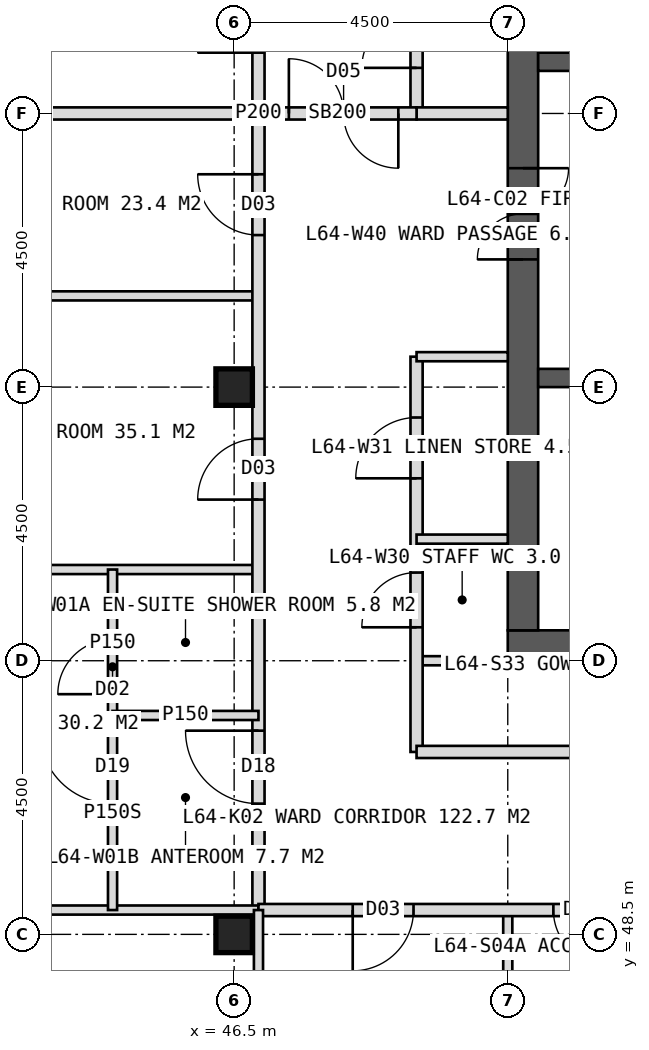
"""IFC4 building model, lengths in metres.
Left out: names, types, materials, properties, quantities, classifications, styles, units other than length and angle.
Written with IfcOpenShell. Run it as: python <this file> out.ifc"""

import sys

from ifc_helpers import new_model, si_unit, direction, frame, frame_2d, origin, origin_2d, place, context, subcontext, project, spatial, rectangle, hollow_rectangle, extrude, element, fill, save


model = new_model("IFC4")
c1 = context("Model", 3, precision=1e-05, world=origin(), true_north=direction((0.0, 1.0)))
c2 = subcontext(c1, "Body", "Model", "MODEL_VIEW")
j1 = project(units=[si_unit("LENGTHUNIT", "METRE"), si_unit("PLANEANGLEUNIT", "RADIAN")], contexts=[c1])
p1 = place(None, origin())
s1 = spatial("IfcSite", under=j1, at=p1, CompositionType="ELEMENT")
p2 = place(p1, origin())
s2 = spatial("IfcBuilding", under=s1, at=p2, CompositionType="ELEMENT")
p3 = place(p2, frame((0.0, 0.0, 266.0)))
s3 = spatial("IfcBuildingStorey", under=s2, at=p3, CompositionType="ELEMENT", Elevation=266.0)
p4 = place(p3, frame((51.0, 53.25, 0.0), z_axis=(0.0, 0.0, 1.0), x_axis=(1.0, 0.0, 0.0)))
e1 = element("IfcWall", 1, at=p4, inside=s3, PredefinedType="SHEAR", context=c2, shape_type="SweptSolid", body=[
    extrude(rectangle(XDim=18.0, YDim=0.5, at=frame_2d((9.0, 0.0))), origin(), (0.0, 0.0, 1.0), 4.0),
])
p5 = place(p4, frame((8.1, 0.0, 0.0)))
e2 = element("IfcOpeningElement", 2, at=p5, cuts=e1, PredefinedType="OPENING", context=c2, shape_type="SweptSolid", body=[
    extrude(rectangle(XDim=1.8, YDim=2.2, at=frame_2d((0.9, 1.1))), frame((0.0, 0.26, 0.0), z_axis=(0.0, -1.0, 0.0), x_axis=(1.0, 0.0, 0.0)), (0.0, 0.0, 1.0), 0.52),
])
p6 = place(p3, frame((51.25, 53.5, 0.0), z_axis=(0.0, 0.0, 1.0), x_axis=(0.0, 1.0, 0.0)))
e3 = element("IfcWall", 3, at=p6, inside=s3, PredefinedType="SHEAR", context=c2, shape_type="SweptSolid", body=[
    extrude(rectangle(XDim=17.0, YDim=0.5, at=frame_2d((8.5, 0.0))), origin(), (0.0, 0.0, 1.0), 4.0),
])
p7 = place(p6, frame((6.1, 0.0, 0.0)))
e4 = element("IfcOpeningElement", 4, at=p7, cuts=e3, PredefinedType="OPENING", context=c2, shape_type="SweptSolid", body=[
    extrude(rectangle(XDim=1.5, YDim=2.2, at=frame_2d((0.75, 1.1))), frame((0.0, 0.26, 0.0), z_axis=(0.0, -1.0, 0.0), x_axis=(1.0, 0.0, 0.0)), (0.0, 0.0, 1.0), 0.52),
])
p8 = place(p3, frame((51.5, 62.85, 0.0), z_axis=(0.0, 0.0, 1.0), x_axis=(1.0, 0.0, 0.0)))
e5 = element("IfcWall", 5, at=p8, inside=s3, PredefinedType="SHEAR", context=c2, shape_type="SweptSolid", body=[
    extrude(rectangle(XDim=3.3, YDim=0.3, at=frame_2d((1.65, 0.0))), origin(), (0.0, 0.0, 1.0), 4.0),
])
p9 = place(p8, frame((1.15, 0.0, 0.0)))
e6 = element("IfcOpeningElement", 6, at=p9, cuts=e5, PredefinedType="OPENING", context=c2, shape_type="SweptSolid", body=[
    extrude(rectangle(XDim=1.2, YDim=2.1, at=frame_2d((0.6, 1.05))), frame((0.0, 0.16, 0.0), z_axis=(0.0, -1.0, 0.0), x_axis=(1.0, 0.0, 0.0)), (0.0, 0.0, 1.0), 0.32),
])
p10 = place(p3, frame((51.5, 57.65, 0.0), z_axis=(0.0, 0.0, 1.0), x_axis=(1.0, 0.0, 0.0)))
e7 = element("IfcWall", 7, at=p10, inside=s3, PredefinedType="SHEAR", context=c2, shape_type="SweptSolid", body=[
    extrude(rectangle(XDim=3.3, YDim=0.3, at=frame_2d((1.65, 0.0))), origin(), (0.0, 0.0, 1.0), 4.0),
])
p11 = place(p10, frame((1.15, 0.0, 0.0)))
e8 = element("IfcOpeningElement", 8, at=p11, cuts=e7, PredefinedType="OPENING", context=c2, shape_type="SweptSolid", body=[
    extrude(rectangle(XDim=1.2, YDim=2.2, at=frame_2d((0.6, 1.1))), frame((0.0, 0.16, 0.0), z_axis=(0.0, -1.0, 0.0), x_axis=(1.0, 0.0, 0.0)), (0.0, 0.0, 1.0), 0.32),
])
for number, where, z_axis, x_axis in (
    (9, (46.5, 48.5, 0.0), (0.0, 0.0, 1.0), (1.0, 0.0, 0.0)),
    (10, (46.5, 57.5, 0.0), (0.0, 0.0, 1.0), (1.0, 0.0, 0.0)),
):
    element("IfcColumn", number, at=place(p3, frame(where, z_axis=z_axis, x_axis=x_axis)), inside=s3, PredefinedType="COLUMN", context=c2, shape_type="SweptSolid", body=[
        extrude(hollow_rectangle(XDim=0.6, YDim=0.6, WallThickness=0.04, at=origin_2d()), origin(), (0.0, 0.0, 1.0), 4.0),
    ])
for number, where, z_axis, x_axis in (
    (11, (46.9, 54.5, 0.0), (0.0, 0.0, 1.0), (-1.0, 0.0, 0.0)),
    (12, (46.9, 59.0, 0.0), (0.0, 0.0, 1.0), (-1.0, 0.0, 0.0)),
):
    element("IfcWall", number, at=place(p3, frame(where, z_axis=z_axis, x_axis=x_axis)), inside=s3, PredefinedType="PARTITIONING", context=c2, shape_type="SweptSolid", body=[
        extrude(rectangle(XDim=7.8, YDim=0.15, at=frame_2d((3.9, 0.0))), origin(), (0.0, 0.0, 1.0), 3.75),
    ])
p12 = place(p3, frame((46.9, 62.0, 0.0), z_axis=(0.0, 0.0, 1.0), x_axis=(-1.0, 0.0, 0.0)))
e13 = element("IfcWall", 13, at=p12, inside=s3, PredefinedType="SOLIDWALL", context=c2, shape_type="SweptSolid", body=[
    extrude(rectangle(XDim=7.8, YDim=0.2, at=frame_2d((3.9, 0.0))), origin(), (0.0, 0.0, 1.0), 2.75),
])
p13 = place(p3, frame((46.9, 48.9, 0.0), z_axis=(0.0, 0.0, 1.0), x_axis=(0.0, 1.0, 0.0)))
e14 = element("IfcWall", 14, at=p13, inside=s3, PredefinedType="PARTITIONING", context=c2, shape_type="SweptSolid", body=[
    extrude(rectangle(XDim=26.2, YDim=0.2, at=frame_2d((13.1, 0.0))), origin(), (0.0, 0.0, 1.0), 3.75),
])
p14 = place(p13, frame((1.75, 0.0, 0.0)))
e15 = element("IfcOpeningElement", 15, at=p14, cuts=e14, PredefinedType="OPENING", context=c2, shape_type="SweptSolid", body=[
    extrude(rectangle(XDim=1.2, YDim=2.2, at=frame_2d((0.6, 1.1))), frame((0.0, 0.11, 0.0), z_axis=(0.0, -1.0, 0.0), x_axis=(1.0, 0.0, 0.0)), (0.0, 0.0, 1.0), 0.22),
])
p15 = place(p13, frame((6.75, 0.0, 0.0)))
e16 = element("IfcOpeningElement", 16, at=p15, cuts=e14, PredefinedType="OPENING", context=c2, shape_type="SweptSolid", body=[
    extrude(rectangle(XDim=1.0, YDim=2.1, at=frame_2d((0.5, 1.05))), frame((0.0, 0.11, 0.0), z_axis=(0.0, -1.0, 0.0), x_axis=(1.0, 0.0, 0.0)), (0.0, 0.0, 1.0), 0.22),
])
p16 = place(p13, frame((11.1, 0.0, 0.0)))
e17 = element("IfcOpeningElement", 17, at=p16, cuts=e14, PredefinedType="OPENING", context=c2, shape_type="SweptSolid", body=[
    extrude(rectangle(XDim=1.0, YDim=2.1, at=frame_2d((0.5, 1.05))), frame((0.0, 0.11, 0.0), z_axis=(0.0, -1.0, 0.0), x_axis=(1.0, 0.0, 0.0)), (0.0, 0.0, 1.0), 0.22),
])
p17 = place(p13, frame((14.1, 0.0, 0.0)))
e18 = element("IfcOpeningElement", 18, at=p17, cuts=e14, PredefinedType="OPENING", context=c2, shape_type="SweptSolid", body=[
    extrude(rectangle(XDim=1.0, YDim=2.1, at=frame_2d((0.5, 1.05))), frame((0.0, 0.11, 0.0), z_axis=(0.0, -1.0, 0.0), x_axis=(1.0, 0.0, 0.0)), (0.0, 0.0, 1.0), 0.22),
])
p18 = place(p13, frame((18.6, 0.0, 0.0)))
e19 = element("IfcOpeningElement", 19, at=p18, cuts=e14, PredefinedType="OPENING", context=c2, shape_type="SweptSolid", body=[
    extrude(rectangle(XDim=1.0, YDim=2.1, at=frame_2d((0.5, 1.05))), frame((0.0, 0.11, 0.0), z_axis=(0.0, -1.0, 0.0), x_axis=(1.0, 0.0, 0.0)), (0.0, 0.0, 1.0), 0.22),
])
p19 = place(p13, frame((23.65, 0.0, 0.0)))
e20 = element("IfcOpeningElement", 20, at=p19, cuts=e14, PredefinedType="OPENING", context=c2, shape_type="SweptSolid", body=[
    extrude(rectangle(XDim=1.0, YDim=2.1, at=frame_2d((0.5, 1.05))), frame((0.0, 0.11, 0.0), z_axis=(0.0, -1.0, 0.0), x_axis=(1.0, 0.0, 0.0)), (0.0, 0.0, 1.0), 0.22),
])
p20 = place(p3, frame((46.9, 48.9, 0.0), z_axis=(0.0, 0.0, 1.0), x_axis=(-1.0, 0.0, 0.0)))
e21 = element("IfcWall", 21, at=p20, inside=s3, PredefinedType="PARTITIONING", context=c2, shape_type="SweptSolid", body=[
    extrude(rectangle(XDim=7.8, YDim=0.15, at=frame_2d((3.9, 0.0))), origin(), (0.0, 0.0, 1.0), 3.75),
])
p21 = place(p3, frame((44.5, 52.1, 0.0), z_axis=(0.0, 0.0, 1.0), x_axis=(0.0, 1.0, 0.0)))
e22 = element("IfcWall", 22, at=p21, inside=s3, PredefinedType="PARTITIONING", context=c2, shape_type="SweptSolid", body=[
    extrude(rectangle(XDim=2.4, YDim=0.15, at=frame_2d((1.2, 0.0))), origin(), (0.0, 0.0, 1.0), 3.75),
])
p22 = place(p21, frame((0.35, 0.0, 0.0)))
e23 = element("IfcOpeningElement", 23, at=p22, cuts=e22, PredefinedType="OPENING", context=c2, shape_type="SweptSolid", body=[
    extrude(rectangle(XDim=0.9, YDim=2.1, at=frame_2d((0.45, 1.05))), frame((0.0, 0.085, 0.0), z_axis=(0.0, -1.0, 0.0), x_axis=(1.0, 0.0, 0.0)), (0.0, 0.0, 1.0), 0.17),
])
p23 = place(p3, frame((46.9, 52.1, 0.0), z_axis=(0.0, 0.0, 1.0), x_axis=(-1.0, 0.0, 0.0)))
e24 = element("IfcWall", 24, at=p23, inside=s3, PredefinedType="PARTITIONING", context=c2, shape_type="SweptSolid", body=[
    extrude(rectangle(XDim=2.4, YDim=0.15, at=frame_2d((1.2, 0.0))), origin(), (0.0, 0.0, 1.0), 3.75),
])
p24 = place(p3, frame((44.5, 48.9, 0.0), z_axis=(0.0, 0.0, 1.0), x_axis=(0.0, 1.0, 0.0)))
e25 = element("IfcWall", 25, at=p24, inside=s3, PredefinedType="PARTITIONING", context=c2, shape_type="SweptSolid", body=[
    extrude(rectangle(XDim=3.2, YDim=0.15, at=frame_2d((1.6, 0.0))), origin(), (0.0, 0.0, 1.0), 3.75),
])
p25 = place(p24, frame((1.75, 0.0, 0.0)))
e26 = element("IfcOpeningElement", 26, at=p25, cuts=e25, PredefinedType="OPENING", context=c2, shape_type="SweptSolid", body=[
    extrude(rectangle(XDim=1.2, YDim=2.2, at=frame_2d((0.6, 1.1))), frame((0.0, 0.085, 0.0), z_axis=(0.0, -1.0, 0.0), x_axis=(1.0, 0.0, 0.0)), (0.0, 0.0, 1.0), 0.17),
])
p26 = place(p3, frame((51.0, 53.0, 0.0), z_axis=(0.0, 0.0, 1.0), x_axis=(-1.0, 0.0, 0.0)))
e27 = element("IfcWall", 27, at=p26, inside=s3, PredefinedType="PARTITIONING", context=c2, shape_type="SweptSolid", body=[
    extrude(rectangle(XDim=1.5, YDim=0.15, at=frame_2d((0.75, 0.0))), origin(), (0.0, 0.0, 1.0), 3.75),
])
p27 = place(p3, frame((49.5, 51.5, 0.0), z_axis=(0.0, 0.0, 1.0), x_axis=(0.0, 1.0, 0.0)))
e28 = element("IfcWall", 28, at=p27, inside=s3, PredefinedType="PARTITIONING", context=c2, shape_type="SweptSolid", body=[
    extrude(rectangle(XDim=6.5, YDim=0.2, at=frame_2d((3.25, 0.0))), origin(), (0.0, 0.0, 1.0), 3.75),
])
p28 = place(p27, frame((2.05, 0.0, 0.0)))
e29 = element("IfcOpeningElement", 29, at=p28, cuts=e28, PredefinedType="OPENING", context=c2, shape_type="SweptSolid", body=[
    extrude(rectangle(XDim=0.9, YDim=2.1, at=frame_2d((0.45, 1.05))), frame((0.0, 0.11, 0.0), z_axis=(0.0, -1.0, 0.0), x_axis=(1.0, 0.0, 0.0)), (0.0, 0.0, 1.0), 0.22),
])
p29 = place(p27, frame((4.5, 0.0, 0.0)))
e30 = element("IfcOpeningElement", 30, at=p29, cuts=e28, PredefinedType="OPENING", context=c2, shape_type="SweptSolid", body=[
    extrude(rectangle(XDim=1.0, YDim=2.1, at=frame_2d((0.5, 1.05))), frame((0.0, 0.11, 0.0), z_axis=(0.0, -1.0, 0.0), x_axis=(1.0, 0.0, 0.0)), (0.0, 0.0, 1.0), 0.22),
])
p30 = place(p3, frame((49.5, 62.0, 0.0), z_axis=(0.0, 0.0, 1.0), x_axis=(0.0, 1.0, 0.0)))
e31 = element("IfcWall", 31, at=p30, inside=s3, PredefinedType="PARTITIONING", context=c2, shape_type="SweptSolid", body=[
    extrude(rectangle(XDim=10.5, YDim=0.2, at=frame_2d((5.25, 0.0))), origin(), (0.0, 0.0, 1.0), 3.75),
])
p31 = place(p30, frame((0.75, 0.0, 0.0)))
e32 = element("IfcOpeningElement", 32, at=p31, cuts=e31, PredefinedType="OPENING", context=c2, shape_type="SweptSolid", body=[
    extrude(rectangle(XDim=0.9, YDim=2.1, at=frame_2d((0.45, 1.05))), frame((0.0, 0.11, 0.0), z_axis=(0.0, -1.0, 0.0), x_axis=(1.0, 0.0, 0.0)), (0.0, 0.0, 1.0), 0.22),
])
p32 = place(p30, frame((5.95, 0.0, 0.0)))
e33 = element("IfcOpeningElement", 33, at=p32, cuts=e31, PredefinedType="OPENING", context=c2, shape_type="SweptSolid", body=[
    extrude(rectangle(XDim=1.0, YDim=2.1, at=frame_2d((0.5, 1.05))), frame((0.0, 0.11, 0.0), z_axis=(0.0, -1.0, 0.0), x_axis=(1.0, 0.0, 0.0)), (0.0, 0.0, 1.0), 0.22),
])
p33 = place(p3, frame((51.0, 58.0, 0.0), z_axis=(0.0, 0.0, 1.0), x_axis=(-1.0, 0.0, 0.0)))
e34 = element("IfcWall", 34, at=p33, inside=s3, PredefinedType="PARTITIONING", context=c2, shape_type="SweptSolid", body=[
    extrude(rectangle(XDim=1.5, YDim=0.15, at=frame_2d((0.75, 0.0))), origin(), (0.0, 0.0, 1.0), 3.75),
])
p34 = place(p3, frame((51.0, 62.0, 0.0), z_axis=(0.0, 0.0, 1.0), x_axis=(-1.0, 0.0, 0.0)))
e35 = element("IfcWall", 35, at=p34, inside=s3, PredefinedType="SOLIDWALL", context=c2, shape_type="SweptSolid", body=[
    extrude(rectangle(XDim=1.5, YDim=0.2, at=frame_2d((0.75, 0.0))), origin(), (0.0, 0.0, 1.0), 2.75),
])
p35 = place(p3, frame((51.0, 55.0, 0.0), z_axis=(0.0, 0.0, 1.0), x_axis=(-1.0, 0.0, 0.0)))
e36 = element("IfcWall", 36, at=p35, inside=s3, PredefinedType="PARTITIONING", context=c2, shape_type="SweptSolid", body=[
    extrude(rectangle(XDim=1.5, YDim=0.15, at=frame_2d((0.75, 0.0))), origin(), (0.0, 0.0, 1.0), 3.75),
])
p36 = place(p3, frame((51.0, 48.9, 0.0), z_axis=(0.0, 0.0, 1.0), x_axis=(0.0, -1.0, 0.0)))
e37 = element("IfcWall", 37, at=p36, inside=s3, PredefinedType="PARTITIONING", context=c2, shape_type="SweptSolid", body=[
    extrude(rectangle(XDim=7.8, YDim=0.15, at=frame_2d((3.9, 0.0))), origin(), (0.0, 0.0, 1.0), 3.75),
])
p37 = place(p3, frame((73.1, 48.9, 0.0), z_axis=(0.0, 0.0, 1.0), x_axis=(-1.0, 0.0, 0.0)))
e38 = element("IfcWall", 38, at=p37, inside=s3, PredefinedType="PARTITIONING", context=c2, shape_type="SweptSolid", body=[
    extrude(rectangle(XDim=26.2, YDim=0.2, at=frame_2d((13.1, 0.0))), origin(), (0.0, 0.0, 1.0), 3.75),
])
p38 = place(p37, frame((1.75, 0.0, 0.0)))
e39 = element("IfcOpeningElement", 39, at=p38, cuts=e38, PredefinedType="OPENING", context=c2, shape_type="SweptSolid", body=[
    extrude(rectangle(XDim=1.2, YDim=2.2, at=frame_2d((0.6, 1.1))), frame((0.0, 0.11, 0.0), z_axis=(0.0, -1.0, 0.0), x_axis=(1.0, 0.0, 0.0)), (0.0, 0.0, 1.0), 0.22),
])
p39 = place(p37, frame((6.75, 0.0, 0.0)))
e40 = element("IfcOpeningElement", 40, at=p39, cuts=e38, PredefinedType="OPENING", context=c2, shape_type="SweptSolid", body=[
    extrude(rectangle(XDim=1.0, YDim=2.1, at=frame_2d((0.5, 1.05))), frame((0.0, 0.11, 0.0), z_axis=(0.0, -1.0, 0.0), x_axis=(1.0, 0.0, 0.0)), (0.0, 0.0, 1.0), 0.22),
])
p40 = place(p37, frame((14.25, 0.0, 0.0)))
e41 = element("IfcOpeningElement", 41, at=p40, cuts=e38, PredefinedType="OPENING", context=c2, shape_type="SweptSolid", body=[
    extrude(rectangle(XDim=1.2, YDim=2.2, at=frame_2d((0.6, 1.1))), frame((0.0, 0.11, 0.0), z_axis=(0.0, -1.0, 0.0), x_axis=(1.0, 0.0, 0.0)), (0.0, 0.0, 1.0), 0.22),
])
p41 = place(p37, frame((20.45, 0.0, 0.0)))
e42 = element("IfcOpeningElement", 42, at=p41, cuts=e38, PredefinedType="OPENING", context=c2, shape_type="SweptSolid", body=[
    extrude(rectangle(XDim=0.9, YDim=2.1, at=frame_2d((0.45, 1.05))), frame((0.0, 0.11, 0.0), z_axis=(0.0, -1.0, 0.0), x_axis=(1.0, 0.0, 0.0)), (0.0, 0.0, 1.0), 0.22),
])
p42 = place(p37, frame((18.45, 0.0, 0.0)))
e43 = element("IfcOpeningElement", 43, at=p42, cuts=e38, PredefinedType="OPENING", context=c2, shape_type="SweptSolid", body=[
    extrude(rectangle(XDim=1.0, YDim=2.1, at=frame_2d((0.5, 1.05))), frame((0.0, 0.11, 0.0), z_axis=(0.0, -1.0, 0.0), x_axis=(1.0, 0.0, 0.0)), (0.0, 0.0, 1.0), 0.22),
])
p43 = place(p37, frame((23.65, 0.0, 0.0)))
e44 = element("IfcOpeningElement", 44, at=p43, cuts=e38, PredefinedType="OPENING", context=c2, shape_type="SweptSolid", body=[
    extrude(rectangle(XDim=1.0, YDim=2.1, at=frame_2d((0.5, 1.05))), frame((0.0, 0.11, 0.0), z_axis=(0.0, -1.0, 0.0), x_axis=(1.0, 0.0, 0.0)), (0.0, 0.0, 1.0), 0.22),
])
p44 = place(p3, frame((46.9, 48.9, 0.0), z_axis=(0.0, 0.0, 1.0), x_axis=(0.0, -1.0, 0.0)))
e45 = element("IfcWall", 45, at=p44, inside=s3, PredefinedType="PARTITIONING", context=c2, shape_type="SweptSolid", body=[
    extrude(rectangle(XDim=7.8, YDim=0.15, at=frame_2d((3.9, 0.0))), origin(), (0.0, 0.0, 1.0), 3.75),
])
p45 = place(p44, frame((4.3, 0.0, 0.0)))
e46 = element("IfcOpeningElement", 46, at=p45, cuts=e45, PredefinedType="OPENING", context=c2, shape_type="SweptSolid", body=[
    extrude(rectangle(XDim=1.0, YDim=2.1, at=frame_2d((0.5, 1.05))), frame((0.0, 0.085, 0.0), z_axis=(0.0, -1.0, 0.0), x_axis=(1.0, 0.0, 0.0)), (0.0, 0.0, 1.0), 0.17),
])
p46 = place(p3, frame((57.75, 51.5, 0.0), z_axis=(0.0, 0.0, 1.0), x_axis=(-1.0, 0.0, 0.0)))
e47 = element("IfcWall", 47, at=p46, inside=s3, PredefinedType="PARTITIONING", context=c2, shape_type="SweptSolid", body=[
    extrude(rectangle(XDim=8.25, YDim=0.2, at=frame_2d((4.125, 0.0))), origin(), (0.0, 0.0, 1.0), 3.75),
])
p47 = place(p46, frame((0.55, 0.0, 0.0)))
e48 = element("IfcOpeningElement", 48, at=p47, cuts=e47, PredefinedType="OPENING", context=c2, shape_type="SweptSolid", body=[
    extrude(rectangle(XDim=0.9, YDim=2.1, at=frame_2d((0.45, 1.05))), frame((0.0, 0.11, 0.0), z_axis=(0.0, -1.0, 0.0), x_axis=(1.0, 0.0, 0.0)), (0.0, 0.0, 1.0), 0.22),
])
p48 = place(p46, frame((4.625, 0.0, 0.0)))
e49 = element("IfcOpeningElement", 49, at=p48, cuts=e47, PredefinedType="OPENING", context=c2, shape_type="SweptSolid", body=[
    extrude(rectangle(XDim=1.0, YDim=2.1, at=frame_2d((0.5, 1.05))), frame((0.0, 0.11, 0.0), z_axis=(0.0, -1.0, 0.0), x_axis=(1.0, 0.0, 0.0)), (0.0, 0.0, 1.0), 0.22),
])
p49 = place(p3, frame((49.5, 62.0, 0.0), z_axis=(0.0, 0.0, 1.0), x_axis=(-1.0, 0.0, 0.0)))
e50 = element("IfcWall", 50, at=p49, inside=s3, PredefinedType="SOLIDWALL", context=c2, shape_type="SweptSolid", body=[
    extrude(rectangle(XDim=2.6, YDim=0.2, at=frame_2d((1.3, 0.0))), origin(), (0.0, 0.0, 1.0), 2.75),
])
p50 = place(p49, frame((0.3, 0.0, 0.0)))
e51 = element("IfcOpeningElement", 51, at=p50, cuts=e50, PredefinedType="OPENING", context=c2, shape_type="SweptSolid", body=[
    extrude(rectangle(XDim=1.8, YDim=2.2, at=frame_2d((0.9, 1.1))), frame((0.0, 0.11, 0.0), z_axis=(0.0, -1.0, 0.0), x_axis=(1.0, 0.0, 0.0)), (0.0, 0.0, 1.0), 0.22),
])
p51 = place(p25, origin())
e52 = element("IfcDoor", 52, at=p51, inside=s3, OperationType="SINGLE_SWING_RIGHT", PredefinedType="DOOR", context=c2, shape_type="SweptSolid", body=[
    extrude(rectangle(XDim=1.2, YDim=2.2, at=frame_2d((0.6, 1.1))), frame((0.0, 0.025, 0.0), z_axis=(0.0, -1.0, 0.0), x_axis=(1.0, 0.0, 0.0)), (0.0, 0.0, 1.0), 0.05),
])
fill(e26, e52)
p52 = place(p14, origin())
e53 = element("IfcDoor", 53, at=p52, inside=s3, OperationType="SINGLE_SWING_RIGHT", PredefinedType="DOOR", context=c2, shape_type="SweptSolid", body=[
    extrude(rectangle(XDim=1.2, YDim=2.2, at=frame_2d((0.6, 1.1))), frame((0.0, 0.025, 0.0), z_axis=(0.0, -1.0, 0.0), x_axis=(1.0, 0.0, 0.0)), (0.0, 0.0, 1.0), 0.05),
])
fill(e15, e53)
p53 = place(p22, origin())
e54 = element("IfcDoor", 54, at=p53, inside=s3, OperationType="SINGLE_SWING_LEFT", PredefinedType="DOOR", context=c2, shape_type="SweptSolid", body=[
    extrude(rectangle(XDim=0.9, YDim=2.1, at=frame_2d((0.45, 1.05))), frame((0.0, 0.025, 0.0), z_axis=(0.0, -1.0, 0.0), x_axis=(1.0, 0.0, 0.0)), (0.0, 0.0, 1.0), 0.05),
])
fill(e23, e54)
p54 = place(p15, origin())
e55 = element("IfcDoor", 55, at=p54, inside=s3, OperationType="SINGLE_SWING_LEFT", PredefinedType="DOOR", context=c2, shape_type="SweptSolid", body=[
    extrude(rectangle(XDim=1.0, YDim=2.1, at=frame_2d((0.5, 1.05))), frame((0.0, 0.025, 0.0), z_axis=(0.0, -1.0, 0.0), x_axis=(1.0, 0.0, 0.0)), (0.0, 0.0, 1.0), 0.05),
])
fill(e16, e55)
p55 = place(p16, origin())
e56 = element("IfcDoor", 56, at=p55, inside=s3, OperationType="SINGLE_SWING_RIGHT", PredefinedType="DOOR", context=c2, shape_type="SweptSolid", body=[
    extrude(rectangle(XDim=1.0, YDim=2.1, at=frame_2d((0.5, 1.05))), frame((0.0, 0.025, 0.0), z_axis=(0.0, -1.0, 0.0), x_axis=(1.0, 0.0, 0.0)), (0.0, 0.0, 1.0), 0.05),
])
fill(e17, e56)
p56 = place(p28, origin())
e57 = element("IfcDoor", 57, at=p56, inside=s3, OperationType="SINGLE_SWING_LEFT", PredefinedType="DOOR", context=c2, shape_type="SweptSolid", body=[
    extrude(rectangle(XDim=0.9, YDim=2.1, at=frame_2d((0.45, 1.05))), frame((0.0, 0.025, 0.0), z_axis=(0.0, -1.0, 0.0), x_axis=(1.0, 0.0, 0.0)), (0.0, 0.0, 1.0), 0.05),
])
fill(e29, e57)
p57 = place(p29, origin())
e58 = element("IfcDoor", 58, at=p57, inside=s3, OperationType="SINGLE_SWING_LEFT", PredefinedType="DOOR", context=c2, shape_type="SweptSolid", body=[
    extrude(rectangle(XDim=1.0, YDim=2.1, at=frame_2d((0.5, 1.05))), frame((0.0, 0.025, 0.0), z_axis=(0.0, -1.0, 0.0), x_axis=(1.0, 0.0, 0.0)), (0.0, 0.0, 1.0), 0.05),
])
fill(e30, e58)
p58 = place(p31, origin())
e59 = element("IfcDoor", 59, at=p58, inside=s3, OperationType="SINGLE_SWING_LEFT", PredefinedType="DOOR", context=c2, shape_type="SweptSolid", body=[
    extrude(rectangle(XDim=0.9, YDim=2.1, at=frame_2d((0.45, 1.05))), frame((0.0, 0.025, 0.0), z_axis=(0.0, -1.0, 0.0), x_axis=(1.0, 0.0, 0.0)), (0.0, 0.0, 1.0), 0.05),
])
fill(e32, e59)
p59 = place(p41, origin())
e60 = element("IfcDoor", 60, at=p59, inside=s3, OperationType="SINGLE_SWING_LEFT", PredefinedType="DOOR", context=c2, shape_type="SweptSolid", body=[
    extrude(rectangle(XDim=0.9, YDim=2.1, at=frame_2d((0.45, 1.05))), frame((0.0, 0.025, 0.0), z_axis=(0.0, -1.0, 0.0), x_axis=(1.0, 0.0, 0.0)), (0.0, 0.0, 1.0), 0.05),
])
fill(e42, e60)
p60 = place(p43, origin())
e61 = element("IfcDoor", 61, at=p60, inside=s3, OperationType="SINGLE_SWING_RIGHT", PredefinedType="DOOR", context=c2, shape_type="SweptSolid", body=[
    extrude(rectangle(XDim=1.0, YDim=2.1, at=frame_2d((0.5, 1.05))), frame((0.0, 0.025, 0.0), z_axis=(0.0, -1.0, 0.0), x_axis=(1.0, 0.0, 0.0)), (0.0, 0.0, 1.0), 0.05),
])
fill(e44, e61)
p61 = place(p50, origin())
e62 = element("IfcDoor", 62, at=p61, inside=s3, OperationType="DOUBLE_DOOR_DOUBLE_SWING", PredefinedType="DOOR", context=c2, shape_type="SweptSolid", body=[
    extrude(rectangle(XDim=1.8, YDim=2.2, at=frame_2d((0.9, 1.1))), frame((0.0, 0.025, 0.0), z_axis=(0.0, -1.0, 0.0), x_axis=(1.0, 0.0, 0.0)), (0.0, 0.0, 1.0), 0.05),
])
fill(e51, e62)
p62 = place(p7, origin())
e63 = element("IfcDoor", 63, at=p62, inside=s3, OperationType="DOUBLE_DOOR_SINGLE_SWING", PredefinedType="DOOR", context=c2, shape_type="SweptSolid", body=[
    extrude(rectangle(XDim=1.5, YDim=2.2, at=frame_2d((0.75, 1.1))), frame((0.0, 0.025, 0.0), z_axis=(0.0, -1.0, 0.0), x_axis=(1.0, 0.0, 0.0)), (0.0, 0.0, 1.0), 0.05),
])
fill(e4, e63)
save(model, sys.argv[1])
